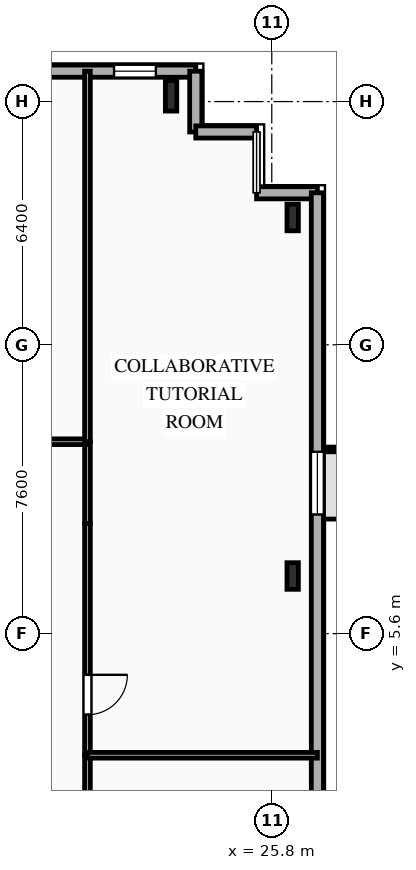
"""IFC4 building model, lengths in metres.
Left out: names, types, materials, properties, quantities, classifications, styles, units other than length and angle.
Written with IfcOpenShell. Run it as: python <this file> out.ifc"""

import sys

from ifc_helpers import new_model, si_unit, direction, frame, frame_2d, origin, origin_2d, place, context, subcontext, project, spatial, rectangle, i_section, extrude, element, fill, save


model = new_model("IFC4")
c1 = context("Model", 3, precision=1e-05, world=origin(), true_north=direction((0.0, 1.0)))
c2 = subcontext(c1, "Body", "Model", "MODEL_VIEW")
j1 = project(units=[si_unit("LENGTHUNIT", "METRE"), si_unit("PLANEANGLEUNIT", "RADIAN")], contexts=[c1])
p1 = place(None, origin())
s1 = spatial("IfcSite", under=j1, at=p1, CompositionType="ELEMENT")
p2 = place(p1, origin())
s2 = spatial("IfcBuilding", under=s1, at=p2, CompositionType="ELEMENT")
p3 = place(p2, frame((0.0, 0.0, 171.2)))
s3 = spatial("IfcBuildingStorey", under=s2, at=p3, CompositionType="ELEMENT", Elevation=171.2)
p4 = place(p3, frame((23.15, 19.75, 0.0), z_axis=(0.0, 0.0, 1.0), x_axis=(1.0, 0.0, 0.0)))
e1 = element("IfcColumn", 1, at=p4, inside=s3, PredefinedType="COLUMN", context=c2, shape_type="SweptSolid", body=[
    extrude(i_section(OverallWidth=0.3, OverallDepth=0.8, WebThickness=0.018, FlangeThickness=0.033, FilletRadius=0.03, at=origin_2d()), origin(), (0.0, 0.0, 1.0), 3.35),
])
for number, where, z_axis, x_axis in (
    (2, (26.35, 7.117, 0.0), (0.0, 0.0, 1.0), (1.0, 0.0, 0.0)),
    (3, (26.35, 16.55, 0.0), (0.0, 0.0, 1.0), (1.0, 0.0, 0.0)),
):
    element("IfcColumn", number, at=place(p3, frame(where, z_axis=z_axis, x_axis=x_axis)), inside=s3, PredefinedType="COLUMN", context=c2, shape_type="SweptSolid", body=[
        extrude(i_section(OverallWidth=0.3, OverallDepth=0.7, WebThickness=0.017, FlangeThickness=0.032, FilletRadius=0.027, at=origin_2d()), origin(), (0.0, 0.0, 1.0), 3.35),
    ])
p5 = place(p3, frame((-25.8, 20.4, 0.0), z_axis=(0.0, 0.0, 1.0), x_axis=(1.0, 0.0, 0.0)))
e4 = element("IfcWall", 4, at=p5, inside=s3, PredefinedType="SOLIDWALL", context=c2, shape_type="SweptSolid", body=[
    extrude(rectangle(XDim=49.6, YDim=0.32, at=frame_2d((24.8, 0.0))), origin(), (0.0, 0.0, 1.0), 3.0),
])
p6 = place(p5, frame((2.135, 0.0, 0.85)))
e5 = element("IfcOpeningElement", 5, at=p6, cuts=e4, PredefinedType="OPENING", context=c2, shape_type="SweptSolid", body=[
    extrude(rectangle(XDim=1.65, YDim=1.85, at=frame_2d((0.825, 0.925))), frame((0.0, 0.17, 0.0), z_axis=(0.0, -1.0, 0.0), x_axis=(1.0, 0.0, 0.0)), (0.0, 0.0, 1.0), 0.34),
])
p7 = place(p5, frame((6.295, 0.0, 0.85)))
e6 = element("IfcOpeningElement", 6, at=p7, cuts=e4, PredefinedType="OPENING", context=c2, shape_type="SweptSolid", body=[
    extrude(rectangle(XDim=1.65, YDim=1.85, at=frame_2d((0.825, 0.925))), frame((0.0, 0.17, 0.0), z_axis=(0.0, -1.0, 0.0), x_axis=(1.0, 0.0, 0.0)), (0.0, 0.0, 1.0), 0.34),
])
p8 = place(p5, frame((10.775, 0.0, 0.85)))
e7 = element("IfcOpeningElement", 7, at=p8, cuts=e4, PredefinedType="OPENING", context=c2, shape_type="SweptSolid", body=[
    extrude(rectangle(XDim=1.65, YDim=1.85, at=frame_2d((0.825, 0.925))), frame((0.0, 0.17, 0.0), z_axis=(0.0, -1.0, 0.0), x_axis=(1.0, 0.0, 0.0)), (0.0, 0.0, 1.0), 0.34),
])
p9 = place(p5, frame((18.49, 0.0, 0.85)))
e8 = element("IfcOpeningElement", 8, at=p9, cuts=e4, PredefinedType="OPENING", context=c2, shape_type="SweptSolid", body=[
    extrude(rectangle(XDim=1.5, YDim=1.85, at=frame_2d((0.75, 0.925))), frame((0.0, 0.17, 0.0), z_axis=(0.0, -1.0, 0.0), x_axis=(1.0, 0.0, 0.0)), (0.0, 0.0, 1.0), 0.34),
])
p10 = place(p5, frame((25.34, 0.0, 0.85)))
e9 = element("IfcOpeningElement", 9, at=p10, cuts=e4, PredefinedType="OPENING", context=c2, shape_type="SweptSolid", body=[
    extrude(rectangle(XDim=2.2, YDim=1.85, at=frame_2d((1.1, 0.925))), frame((0.0, 0.17, 0.0), z_axis=(0.0, -1.0, 0.0), x_axis=(1.0, 0.0, 0.0)), (0.0, 0.0, 1.0), 0.34),
])
p11 = place(p5, frame((33.74, 0.0, 0.85)))
e10 = element("IfcOpeningElement", 10, at=p11, cuts=e4, PredefinedType="OPENING", context=c2, shape_type="SweptSolid", body=[
    extrude(rectangle(XDim=2.2, YDim=1.85, at=frame_2d((1.1, 0.925))), frame((0.0, 0.17, 0.0), z_axis=(0.0, -1.0, 0.0), x_axis=(1.0, 0.0, 0.0)), (0.0, 0.0, 1.0), 0.34),
])
p12 = place(p5, frame((42.095, 0.0, 0.85)))
e11 = element("IfcOpeningElement", 11, at=p12, cuts=e4, PredefinedType="OPENING", context=c2, shape_type="SweptSolid", body=[
    extrude(rectangle(XDim=1.65, YDim=1.85, at=frame_2d((0.825, 0.925))), frame((0.0, 0.17, 0.0), z_axis=(0.0, -1.0, 0.0), x_axis=(1.0, 0.0, 0.0)), (0.0, 0.0, 1.0), 0.34),
])
p13 = place(p5, frame((47.45, 0.0, 0.85)))
e12 = element("IfcOpeningElement", 12, at=p13, cuts=e4, PredefinedType="OPENING", context=c2, shape_type="SweptSolid", body=[
    extrude(rectangle(XDim=1.1, YDim=1.85, at=frame_2d((0.55, 0.925))), frame((0.0, 0.17, 0.0), z_axis=(0.0, -1.0, 0.0), x_axis=(1.0, 0.0, 0.0)), (0.0, 0.0, 1.0), 0.34),
])
for number, where, z_axis, x_axis in (
    (13, (23.8, 20.4, 0.0), (0.0, 0.0, 1.0), (0.0, -1.0, 0.0)),
    (14, (23.8, 18.8, 0.0), (0.0, 0.0, 1.0), (1.0, 0.0, 0.0)),
):
    element("IfcWall", number, at=place(p3, frame(where, z_axis=z_axis, x_axis=x_axis)), inside=s3, PredefinedType="SOLIDWALL", context=c2, shape_type="SweptSolid", body=[
        extrude(rectangle(XDim=1.6, YDim=0.32, at=frame_2d((0.8, 0.0))), origin(), (0.0, 0.0, 1.0), 3.0),
    ])
p14 = place(p3, frame((25.4, 17.2, 0.0), z_axis=(0.0, 0.0, 1.0), x_axis=(1.0, 0.0, 0.0)))
e15 = element("IfcWall", 15, at=p14, inside=s3, PredefinedType="SOLIDWALL", context=c2, shape_type="SweptSolid", body=[
    extrude(rectangle(XDim=1.6, YDim=0.32, at=frame_2d((0.8, 0.0))), origin(), (0.0, 0.0, 1.0), 3.0),
])
p15 = place(p3, frame((27.0, 17.2, 0.0), z_axis=(0.0, 0.0, 1.0), x_axis=(0.0, -1.0, 0.0)))
e16 = element("IfcWall", 16, at=p15, inside=s3, PredefinedType="SOLIDWALL", context=c2, shape_type="SweptSolid", body=[
    extrude(rectangle(XDim=29.6, YDim=0.32, at=frame_2d((14.8, 0.0))), origin(), (0.0, 0.0, 1.0), 3.0),
])
p16 = place(p15, frame((6.815, 0.0, 0.85)))
e17 = element("IfcOpeningElement", 17, at=p16, cuts=e16, PredefinedType="OPENING", context=c2, shape_type="SweptSolid", body=[
    extrude(rectangle(XDim=1.65, YDim=1.85, at=frame_2d((0.825, 0.925))), frame((0.0, 0.17, 0.0), z_axis=(0.0, -1.0, 0.0), x_axis=(1.0, 0.0, 0.0)), (0.0, 0.0, 1.0), 0.34),
])
p17 = place(p15, frame((21.175, 0.0, 0.85)))
e18 = element("IfcOpeningElement", 18, at=p17, cuts=e16, PredefinedType="OPENING", context=c2, shape_type="SweptSolid", body=[
    extrude(rectangle(XDim=1.65, YDim=1.85, at=frame_2d((0.825, 0.925))), frame((0.0, 0.17, 0.0), z_axis=(0.0, -1.0, 0.0), x_axis=(1.0, 0.0, 0.0)), (0.0, 0.0, 1.0), 0.34),
])
p18 = place(p3, frame((20.95, 10.65, 0.0), z_axis=(0.0, 0.0, 1.0), x_axis=(0.0, -1.0, 0.0)))
e19 = element("IfcWall", 19, at=p18, inside=s3, PredefinedType="PARTITIONING", context=c2, shape_type="SweptSolid", body=[
    extrude(rectangle(XDim=2.15, YDim=0.15, at=frame_2d((1.075, 0.0))), origin(), (0.0, 0.0, 1.0), 3.0),
])
p19 = place(p3, frame((13.17, 10.65, 0.0), z_axis=(0.0, 0.0, 1.0), x_axis=(1.0, 0.0, 0.0)))
e20 = element("IfcWall", 20, at=p19, inside=s3, PredefinedType="PARTITIONING", context=c2, shape_type="SweptSolid", body=[
    extrude(rectangle(XDim=7.78, YDim=0.15, at=frame_2d((3.89, 0.0))), origin(), (0.0, 0.0, 1.0), 3.0),
])
p20 = place(p19, frame((1.276, 0.0, 0.0)))
e21 = element("IfcOpeningElement", 21, at=p20, cuts=e20, PredefinedType="OPENING", context=c2, shape_type="SweptSolid", body=[
    extrude(rectangle(XDim=1.05, YDim=2.15, at=frame_2d((0.525, 1.075))), frame((0.0, 0.085, 0.0), z_axis=(0.0, -1.0, 0.0), x_axis=(1.0, 0.0, 0.0)), (0.0, 0.0, 1.0), 0.17),
])
p21 = place(p3, frame((20.95, 2.4, 0.0), z_axis=(0.0, 0.0, 1.0), x_axis=(0.0, -1.0, 0.0)))
e22 = element("IfcWall", 22, at=p21, inside=s3, PredefinedType="PARTITIONING", context=c2, shape_type="SweptSolid", body=[
    extrude(rectangle(XDim=8.0, YDim=0.15, at=frame_2d((4.0, 0.0))), origin(), (0.0, 0.0, 1.0), 3.0),
])
p22 = place(p21, frame((2.028, 0.0, 0.0)))
e23 = element("IfcOpeningElement", 23, at=p22, cuts=e22, PredefinedType="OPENING", context=c2, shape_type="SweptSolid", body=[
    extrude(rectangle(XDim=1.05, YDim=2.15, at=frame_2d((0.525, 1.075))), frame((0.0, 0.085, 0.0), z_axis=(0.0, -1.0, 0.0), x_axis=(1.0, 0.0, 0.0)), (0.0, 0.0, 1.0), 0.17),
])
p23 = place(p3, frame((20.95, 8.5, 0.0), z_axis=(0.0, 0.0, 1.0), x_axis=(0.0, -1.0, 0.0)))
e24 = element("IfcWall", 24, at=p23, inside=s3, PredefinedType="PARTITIONING", context=c2, shape_type="SweptSolid", body=[
    extrude(rectangle(XDim=6.1, YDim=0.15, at=frame_2d((3.05, 0.0))), origin(), (0.0, 0.0, 1.0), 3.0),
])
p24 = place(p23, frame((3.984, 0.0, 0.0)))
e25 = element("IfcOpeningElement", 25, at=p24, cuts=e24, PredefinedType="OPENING", context=c2, shape_type="SweptSolid", body=[
    extrude(rectangle(XDim=1.05, YDim=2.15, at=frame_2d((0.525, 1.075))), frame((0.0, 0.085, 0.0), z_axis=(0.0, -1.0, 0.0), x_axis=(1.0, 0.0, 0.0)), (0.0, 0.0, 1.0), 0.17),
])
p25 = place(p3, frame((20.95, 2.4, 0.0), z_axis=(0.0, 0.0, 1.0), x_axis=(1.0, 0.0, 0.0)))
e26 = element("IfcWall", 26, at=p25, inside=s3, PredefinedType="PARTITIONING", context=c2, shape_type="SweptSolid", body=[
    extrude(rectangle(XDim=6.05, YDim=0.15, at=frame_2d((3.025, 0.0))), origin(), (0.0, 0.0, 1.0), 3.0),
])
p26 = place(p3, frame((20.95, 10.65, 0.0), z_axis=(0.0, 0.0, 1.0), x_axis=(0.0, 1.0, 0.0)))
e27 = element("IfcWall", 27, at=p26, inside=s3, PredefinedType="PARTITIONING", context=c2, shape_type="SweptSolid", body=[
    extrude(rectangle(XDim=9.75, YDim=0.15, at=frame_2d((4.875, 0.0))), origin(), (0.0, 0.0, 1.0), 2.485),
])
p27 = place(p13, origin())
e28 = element("IfcWindow", 28, at=p27, inside=s3, PartitioningType="SINGLE_PANEL", PredefinedType="WINDOW", context=c2, shape_type="SweptSolid", body=[
    extrude(rectangle(XDim=1.1, YDim=1.85, at=frame_2d((0.55, 0.925))), frame((0.0, 0.03, 0.0), z_axis=(0.0, -1.0, 0.0), x_axis=(1.0, 0.0, 0.0)), (0.0, 0.0, 1.0), 0.06),
])
fill(e12, e28)
p28 = place(p16, origin())
e29 = element("IfcWindow", 29, at=p28, inside=s3, PartitioningType="SINGLE_PANEL", PredefinedType="WINDOW", context=c2, shape_type="SweptSolid", body=[
    extrude(rectangle(XDim=1.65, YDim=1.85, at=frame_2d((0.825, 0.925))), frame((0.0, 0.03, 0.0), z_axis=(0.0, -1.0, 0.0), x_axis=(1.0, 0.0, 0.0)), (0.0, 0.0, 1.0), 0.06),
])
fill(e17, e29)
p29 = place(p24, origin())
e30 = element("IfcDoor", 30, at=p29, inside=s3, OperationType="SINGLE_SWING_LEFT", PredefinedType="DOOR", context=c2, shape_type="SweptSolid", body=[
    extrude(rectangle(XDim=1.05, YDim=2.15, at=frame_2d((0.525, 1.075))), frame((0.0, 0.025, 0.0), z_axis=(0.0, -1.0, 0.0), x_axis=(1.0, 0.0, 0.0)), (0.0, 0.0, 1.0), 0.05),
])
fill(e25, e30)
save(model, sys.argv[1])
